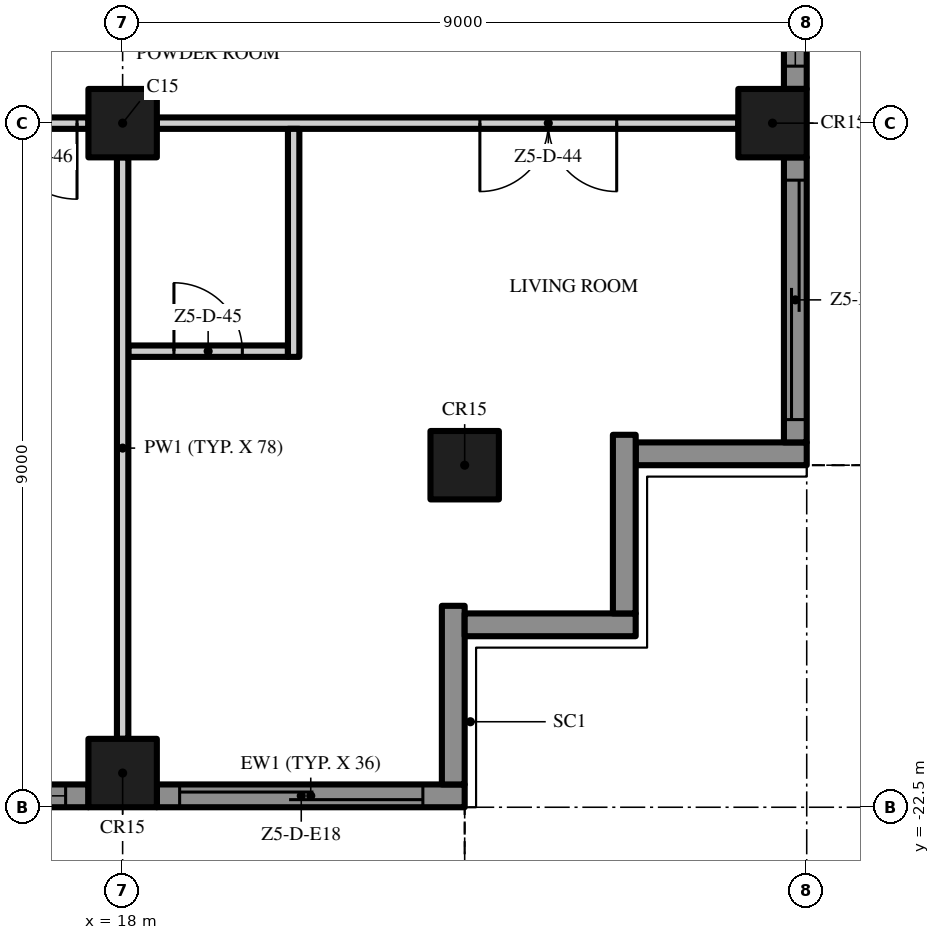
"""IFC4 building model, lengths in metres.
Left out: names, types, materials, properties, quantities, classifications, styles, units other than length and angle.
Written with IfcOpenShell. Run it as: python <this file> out.ifc"""

import sys

from ifc_helpers import new_model, si_unit, direction, frame, frame_2d, origin, origin_2d, place, context, subcontext, project, spatial, polyline, rectangle, outline, extrude, element, fill, save


model = new_model("IFC4")
c1 = context("Model", 3, precision=1e-05, world=origin(), true_north=direction((0.0, 1.0)))
c2 = subcontext(c1, "Body", "Model", "MODEL_VIEW")
j1 = project(units=[si_unit("LENGTHUNIT", "METRE"), si_unit("PLANEANGLEUNIT", "RADIAN")], contexts=[c1])
p1 = place(None, origin())
s1 = spatial("IfcSite", under=j1, at=p1, CompositionType="ELEMENT")
p2 = place(p1, origin())
s2 = spatial("IfcBuilding", under=s1, at=p2, CompositionType="ELEMENT")
p3 = place(p2, frame((0.0, 0.0, 280.6)))
s3 = spatial("IfcBuildingStorey", under=s2, at=p3, CompositionType="ELEMENT", Elevation=280.6)
for number, where, z_axis, x_axis in (
    (1, (18.0, -13.5, 0.0), (0.0, 0.0, 1.0), (1.0, 0.0, 0.0)),
    (2, (18.0, -22.05, 0.0), (0.0, 0.0, 1.0), (1.0, 0.0, 0.0)),
    (3, (26.55, -13.5, 0.0), (0.0, 0.0, 1.0), (1.0, 0.0, 0.0)),
    (4, (22.5, -18.0, 0.0), (0.0, 0.0, 1.0), (1.0, 0.0, 0.0)),
):
    element("IfcColumn", number, at=place(p3, frame(where, z_axis=z_axis, x_axis=x_axis)), inside=s3, PredefinedType="COLUMN", context=c2, shape_type="SweptSolid", body=[
        extrude(rectangle(XDim=0.9, YDim=0.9, at=origin_2d()), origin(), (0.0, 0.0, 1.0), 3.5),
    ])
p4 = place(p3, frame((17.55, -22.35, 0.0), z_axis=(0.0, 0.0, 1.0), x_axis=(-1.0, 0.0, 0.0)))
e5 = element("IfcWall", 5, at=p4, inside=s3, PredefinedType="SOLIDWALL", context=c2, shape_type="SweptSolid", body=[
    extrude(rectangle(XDim=8.1, YDim=0.3, at=frame_2d((4.05, 0.0))), origin(), (0.0, 0.0, 1.0), 3.5),
])
p5 = place(p4, frame((4.6, 0.0, 0.45)))
e6 = element("IfcOpeningElement", 6, at=p5, cuts=e5, PredefinedType="OPENING", context=c2, shape_type="SweptSolid", body=[
    extrude(rectangle(XDim=3.2, YDim=2.65, at=frame_2d((1.6, 1.325))), frame((0.0, 0.16, 0.0), z_axis=(0.0, -1.0, 0.0), x_axis=(1.0, 0.0, 0.0)), (0.0, 0.0, 1.0), 0.32),
])
p6 = place(p4, frame((0.3, 0.0, 0.45)))
e7 = element("IfcOpeningElement", 7, at=p6, cuts=e5, PredefinedType="OPENING", context=c2, shape_type="SweptSolid", body=[
    extrude(rectangle(XDim=3.2, YDim=2.65, at=frame_2d((1.6, 1.325))), frame((0.0, 0.16, 0.0), z_axis=(0.0, -1.0, 0.0), x_axis=(1.0, 0.0, 0.0)), (0.0, 0.0, 1.0), 0.32),
])
p7 = place(p3, frame((22.5, -22.35, 0.0), z_axis=(0.0, 0.0, 1.0), x_axis=(-1.0, 0.0, 0.0)))
e8 = element("IfcWall", 8, at=p7, inside=s3, PredefinedType="SOLIDWALL", context=c2, shape_type="SweptSolid", body=[
    extrude(rectangle(XDim=4.05, YDim=0.3, at=frame_2d((2.025, 0.0))), origin(), (0.0, 0.0, 1.0), 3.5),
])
p8 = place(p7, frame((0.55, 0.0, 0.0)))
e9 = element("IfcOpeningElement", 9, at=p8, cuts=e8, PredefinedType="OPENING", context=c2, shape_type="SweptSolid", body=[
    extrude(rectangle(XDim=3.2, YDim=2.4, at=frame_2d((1.6, 1.2))), frame((0.0, 0.16, 0.0), z_axis=(0.0, -1.0, 0.0), x_axis=(1.0, 0.0, 0.0)), (0.0, 0.0, 1.0), 0.32),
])
p9 = place(p3, frame((22.35, -19.85, 0.0), z_axis=(0.0, 0.0, 1.0), x_axis=(0.0, -1.0, 0.0)))
e10 = element("IfcWall", 10, at=p9, inside=s3, PredefinedType="SOLIDWALL", context=c2, shape_type="SweptSolid", body=[
    extrude(rectangle(XDim=2.35, YDim=0.3, at=frame_2d((1.175, 0.0))), origin(), (0.0, 0.0, 1.0), 3.5),
])
p10 = place(p3, frame((24.75, -20.1, 0.0), z_axis=(0.0, 0.0, 1.0), x_axis=(-1.0, 0.0, 0.0)))
e11 = element("IfcWall", 11, at=p10, inside=s3, PredefinedType="SOLIDWALL", context=c2, shape_type="SweptSolid", body=[
    extrude(rectangle(XDim=2.25, YDim=0.3, at=frame_2d((1.125, 0.0))), origin(), (0.0, 0.0, 1.0), 3.5),
])
p11 = place(p3, frame((24.6, -17.6, 0.0), z_axis=(0.0, 0.0, 1.0), x_axis=(0.0, -1.0, 0.0)))
e12 = element("IfcWall", 12, at=p11, inside=s3, PredefinedType="SOLIDWALL", context=c2, shape_type="SweptSolid", body=[
    extrude(rectangle(XDim=2.35, YDim=0.3, at=frame_2d((1.175, 0.0))), origin(), (0.0, 0.0, 1.0), 3.5),
])
p12 = place(p3, frame((27.0, -17.85, 0.0), z_axis=(0.0, 0.0, 1.0), x_axis=(-1.0, 0.0, 0.0)))
e13 = element("IfcWall", 13, at=p12, inside=s3, PredefinedType="SOLIDWALL", context=c2, shape_type="SweptSolid", body=[
    extrude(rectangle(XDim=2.25, YDim=0.3, at=frame_2d((1.125, 0.0))), origin(), (0.0, 0.0, 1.0), 3.5),
])
p13 = place(p3, frame((26.85, -13.95, 0.0), z_axis=(0.0, 0.0, 1.0), x_axis=(0.0, -1.0, 0.0)))
e14 = element("IfcWall", 14, at=p13, inside=s3, PredefinedType="SOLIDWALL", context=c2, shape_type="SweptSolid", body=[
    extrude(rectangle(XDim=3.75, YDim=0.3, at=frame_2d((1.875, 0.0))), origin(), (0.0, 0.0, 1.0), 3.5),
])
p14 = place(p13, frame((0.3, 0.0, 0.0)))
e15 = element("IfcOpeningElement", 15, at=p14, cuts=e14, PredefinedType="OPENING", context=c2, shape_type="SweptSolid", body=[
    extrude(rectangle(XDim=3.15, YDim=2.4, at=frame_2d((1.575, 1.2))), frame((0.0, 0.16, 0.0), z_axis=(0.0, -1.0, 0.0), x_axis=(1.0, 0.0, 0.0)), (0.0, 0.0, 1.0), 0.32),
])
p15 = place(p3, frame((26.85, -4.95, 0.0), z_axis=(0.0, 0.0, 1.0), x_axis=(0.0, -1.0, 0.0)))
e16 = element("IfcWall", 16, at=p15, inside=s3, PredefinedType="SOLIDWALL", context=c2, shape_type="SweptSolid", body=[
    extrude(rectangle(XDim=8.1, YDim=0.3, at=frame_2d((4.05, 0.0))), origin(), (0.0, 0.0, 1.0), 3.5),
])
p16 = place(p15, frame((4.6, 0.0, 0.45)))
e17 = element("IfcOpeningElement", 17, at=p16, cuts=e16, PredefinedType="OPENING", context=c2, shape_type="SweptSolid", body=[
    extrude(rectangle(XDim=3.2, YDim=2.65, at=frame_2d((1.6, 1.325))), frame((0.0, 0.16, 0.0), z_axis=(0.0, -1.0, 0.0), x_axis=(1.0, 0.0, 0.0)), (0.0, 0.0, 1.0), 0.32),
])
p17 = place(p15, frame((0.3, 0.0, 0.45)))
e18 = element("IfcOpeningElement", 18, at=p17, cuts=e16, PredefinedType="OPENING", context=c2, shape_type="SweptSolid", body=[
    extrude(rectangle(XDim=3.2, YDim=2.65, at=frame_2d((1.6, 1.325))), frame((0.0, 0.16, 0.0), z_axis=(0.0, -1.0, 0.0), x_axis=(1.0, 0.0, 0.0)), (0.0, 0.0, 1.0), 0.32),
])
p18 = place(p3, origin())
e19 = element("IfcWall", 19, at=p18, inside=s3, PredefinedType="USERDEFINED", context=c2, shape_type="SweptSolid", body=[
    extrude(outline(polyline([(-22.5, -25.5), (-21.0, -25.271), (-19.5, -24.671), (-18.0, -23.929), (-16.5, -23.329), (-15.0, -23.1), (-13.5, -23.329), (-12.0, -23.929), (-10.5, -24.671), (-9.0, -25.271), (-7.5, -25.5), (-6.0, -25.271), (-4.5, -24.671), (-3.0, -23.929), (-1.5, -23.329), (0.0, -23.1), (1.5, -23.329), (3.0, -23.929), (4.5, -24.671), (6.0, -25.271), (7.5, -25.5), (9.0, -25.271), (10.5, -24.671), (12.0, -23.929), (13.5, -23.329), (15.0, -23.1), (16.5, -23.329), (18.0, -23.929), (19.5, -24.671), (21.0, -25.271), (22.5, -25.5), (22.538, -25.253), (21.066, -25.028), (19.602, -24.442), (18.102, -23.701), (16.566, -23.086), (15.0, -22.847), (13.434, -23.086), (11.898, -23.701), (10.398, -24.442), (8.934, -25.028), (7.5, -25.247), (6.066, -25.028), (4.602, -24.442), (3.102, -23.701), (1.566, -23.086), (0.0, -22.847), (-1.566, -23.086), (-3.102, -23.701), (-4.602, -24.442), (-6.066, -25.028), (-7.5, -25.247), (-8.934, -25.028), (-10.398, -24.442), (-11.898, -23.701), (-13.434, -23.086), (-15.0, -22.847), (-16.566, -23.086), (-18.102, -23.701), (-19.602, -24.442), (-21.066, -25.028), (-22.538, -25.253), (-22.5, -25.5)])), origin(), (0.0, 0.0, 1.0), 0.9),
])
p19 = place(p3, origin())
e20 = element("IfcWall", 20, at=p19, inside=s3, PredefinedType="USERDEFINED", context=c2, shape_type="SweptSolid", body=[
    extrude(outline(polyline([(30.0, -18.0), (29.771, -16.5), (29.171, -15.0), (28.429, -13.5), (27.829, -12.0), (27.6, -10.5), (27.829, -9.0), (28.429, -7.5), (29.171, -6.0), (29.771, -4.5), (30.0, -3.0), (29.771, -1.5), (29.171, 0.0), (28.429, 1.5), (27.829, 3.0), (27.6, 4.5), (27.829, 6.0), (28.429, 7.5), (29.171, 9.0), (29.771, 10.5), (30.0, 12.0), (29.771, 13.5), (29.171, 15.0), (28.429, 16.5), (27.829, 18.0), (27.597, 17.907), (28.201, 16.398), (28.942, 14.898), (29.528, 13.434), (29.747, 12.0), (29.528, 10.566), (28.942, 9.102), (28.201, 7.602), (27.586, 6.066), (27.347, 4.5), (27.586, 2.934), (28.201, 1.398), (28.942, -0.102), (29.528, -1.566), (29.747, -3.0), (29.528, -4.434), (28.942, -5.898), (28.201, -7.398), (27.586, -8.934), (27.347, -10.5), (27.586, -12.066), (28.201, -13.602), (28.942, -15.102), (29.528, -16.566), (29.753, -18.038), (30.0, -18.0)])), origin(), (0.0, 0.0, 1.0), 0.9),
])
p20 = place(p3, frame((18.075, -16.5, 0.0), z_axis=(0.0, 0.0, 1.0), x_axis=(1.0, 0.0, 0.0)))
e21 = element("IfcWall", 21, at=p20, inside=s3, PredefinedType="PARTITIONING", context=c2, shape_type="SweptSolid", body=[
    extrude(rectangle(XDim=2.1, YDim=0.15, at=frame_2d((1.05, 0.0))), origin(), (0.0, 0.0, 1.0), 3.5),
])
p21 = place(p20, frame((0.6, 0.0, 0.0)))
e22 = element("IfcOpeningElement", 22, at=p21, cuts=e21, PredefinedType="OPENING", context=c2, shape_type="SweptSolid", body=[
    extrude(rectangle(XDim=0.9, YDim=2.1, at=frame_2d((0.45, 1.05))), frame((0.0, 0.085, 0.0), z_axis=(0.0, -1.0, 0.0), x_axis=(1.0, 0.0, 0.0)), (0.0, 0.0, 1.0), 0.17),
])
p22 = place(p3, frame((17.55, -13.5, 0.0), z_axis=(0.0, 0.0, 1.0), x_axis=(-1.0, 0.0, 0.0)))
e23 = element("IfcWall", 23, at=p22, inside=s3, PredefinedType="PARTITIONING", context=c2, shape_type="SweptSolid", body=[
    extrude(rectangle(XDim=8.1, YDim=0.15, at=frame_2d((4.05, 0.0))), origin(), (0.0, 0.0, 1.0), 3.5),
])
p23 = place(p22, frame((0.15, 0.0, 0.0)))
e24 = element("IfcOpeningElement", 24, at=p23, cuts=e23, PredefinedType="OPENING", context=c2, shape_type="SweptSolid", body=[
    extrude(rectangle(XDim=1.0, YDim=2.4, at=frame_2d((0.5, 1.2))), frame((0.0, 0.085, 0.0), z_axis=(0.0, -1.0, 0.0), x_axis=(1.0, 0.0, 0.0)), (0.0, 0.0, 1.0), 0.17),
])
p24 = place(p22, frame((6.95, 0.0, 0.0)))
e25 = element("IfcOpeningElement", 25, at=p24, cuts=e23, PredefinedType="OPENING", context=c2, shape_type="SweptSolid", body=[
    extrude(rectangle(XDim=1.0, YDim=2.4, at=frame_2d((0.5, 1.2))), frame((0.0, 0.085, 0.0), z_axis=(0.0, -1.0, 0.0), x_axis=(1.0, 0.0, 0.0)), (0.0, 0.0, 1.0), 0.17),
])
p25 = place(p3, frame((26.1, -13.5, 0.0), z_axis=(0.0, 0.0, 1.0), x_axis=(-1.0, 0.0, 0.0)))
e26 = element("IfcWall", 26, at=p25, inside=s3, PredefinedType="PARTITIONING", context=c2, shape_type="SweptSolid", body=[
    extrude(rectangle(XDim=7.65, YDim=0.15, at=frame_2d((3.825, 0.0))), origin(), (0.0, 0.0, 1.0), 3.5),
])
p26 = place(p25, frame((1.6, 0.0, 0.0)))
e27 = element("IfcOpeningElement", 27, at=p26, cuts=e26, PredefinedType="OPENING", context=c2, shape_type="SweptSolid", body=[
    extrude(rectangle(XDim=1.8, YDim=2.4, at=frame_2d((0.9, 1.2))), frame((0.0, 0.085, 0.0), z_axis=(0.0, -1.0, 0.0), x_axis=(1.0, 0.0, 0.0)), (0.0, 0.0, 1.0), 0.17),
])
p27 = place(p3, frame((18.0, -21.6, 0.0), z_axis=(0.0, 0.0, 1.0), x_axis=(0.0, 1.0, 0.0)))
e28 = element("IfcWall", 28, at=p27, inside=s3, PredefinedType="PARTITIONING", context=c2, shape_type="SweptSolid", body=[
    extrude(rectangle(XDim=7.65, YDim=0.15, at=frame_2d((3.825, 0.0))), origin(), (0.0, 0.0, 1.0), 3.5),
])
p28 = place(p3, frame((20.25, -16.575, 0.0), z_axis=(0.0, 0.0, 1.0), x_axis=(0.0, 1.0, 0.0)))
e29 = element("IfcWall", 29, at=p28, inside=s3, PredefinedType="PARTITIONING", context=c2, shape_type="SweptSolid", body=[
    extrude(rectangle(XDim=3.0, YDim=0.15, at=frame_2d((1.5, 0.0))), origin(), (0.0, 0.0, 1.0), 3.5),
])
p29 = place(p6, origin())
e30 = element("IfcWindow", 30, at=p29, inside=s3, PartitioningType="SINGLE_PANEL", PredefinedType="WINDOW", context=c2, shape_type="SweptSolid", body=[
    extrude(rectangle(XDim=3.2, YDim=2.65, at=frame_2d((1.6, 1.325))), frame((0.0, 0.03, 0.0), z_axis=(0.0, -1.0, 0.0), x_axis=(1.0, 0.0, 0.0)), (0.0, 0.0, 1.0), 0.06),
])
fill(e7, e30)
p30 = place(p8, origin())
e31 = element("IfcDoor", 31, at=p30, inside=s3, OperationType="SINGLE_SWING_LEFT", PredefinedType="DOOR", context=c2, shape_type="SweptSolid", body=[
    extrude(rectangle(XDim=3.2, YDim=2.4, at=frame_2d((1.6, 1.2))), frame((0.0, 0.025, 0.0), z_axis=(0.0, -1.0, 0.0), x_axis=(1.0, 0.0, 0.0)), (0.0, 0.0, 1.0), 0.05),
])
fill(e9, e31)
p31 = place(p14, origin())
e32 = element("IfcDoor", 32, at=p31, inside=s3, OperationType="SINGLE_SWING_LEFT", PredefinedType="DOOR", context=c2, shape_type="SweptSolid", body=[
    extrude(rectangle(XDim=3.15, YDim=2.4, at=frame_2d((1.575, 1.2))), frame((0.0, 0.025, 0.0), z_axis=(0.0, -1.0, 0.0), x_axis=(1.0, 0.0, 0.0)), (0.0, 0.0, 1.0), 0.05),
])
fill(e15, e32)
p32 = place(p16, origin())
e33 = element("IfcWindow", 33, at=p32, inside=s3, PartitioningType="SINGLE_PANEL", PredefinedType="WINDOW", context=c2, shape_type="SweptSolid", body=[
    extrude(rectangle(XDim=3.2, YDim=2.65, at=frame_2d((1.6, 1.325))), frame((0.0, 0.03, 0.0), z_axis=(0.0, -1.0, 0.0), x_axis=(1.0, 0.0, 0.0)), (0.0, 0.0, 1.0), 0.06),
])
fill(e17, e33)
p33 = place(p26, origin())
e34 = element("IfcDoor", 34, at=p33, inside=s3, OperationType="DOUBLE_DOOR_SINGLE_SWING", PredefinedType="DOOR", context=c2, shape_type="SweptSolid", body=[
    extrude(rectangle(XDim=1.8, YDim=2.4, at=frame_2d((0.9, 1.2))), frame((0.0, 0.025, 0.0), z_axis=(0.0, -1.0, 0.0), x_axis=(1.0, 0.0, 0.0)), (0.0, 0.0, 1.0), 0.05),
])
fill(e27, e34)
p34 = place(p21, origin())
e35 = element("IfcDoor", 35, at=p34, inside=s3, OperationType="SINGLE_SWING_LEFT", PredefinedType="DOOR", context=c2, shape_type="SweptSolid", body=[
    extrude(rectangle(XDim=0.9, YDim=2.1, at=frame_2d((0.45, 1.05))), frame((0.0, 0.025, 0.0), z_axis=(0.0, -1.0, 0.0), x_axis=(1.0, 0.0, 0.0)), (0.0, 0.0, 1.0), 0.05),
])
fill(e22, e35)
p35 = place(p23, origin())
e36 = element("IfcDoor", 36, at=p35, inside=s3, OperationType="SINGLE_SWING_LEFT", PredefinedType="DOOR", context=c2, shape_type="SweptSolid", body=[
    extrude(rectangle(XDim=1.0, YDim=2.4, at=frame_2d((0.5, 1.2))), frame((0.0, 0.025, 0.0), z_axis=(0.0, -1.0, 0.0), x_axis=(1.0, 0.0, 0.0)), (0.0, 0.0, 1.0), 0.05),
])
fill(e24, e36)
save(model, sys.argv[1])
